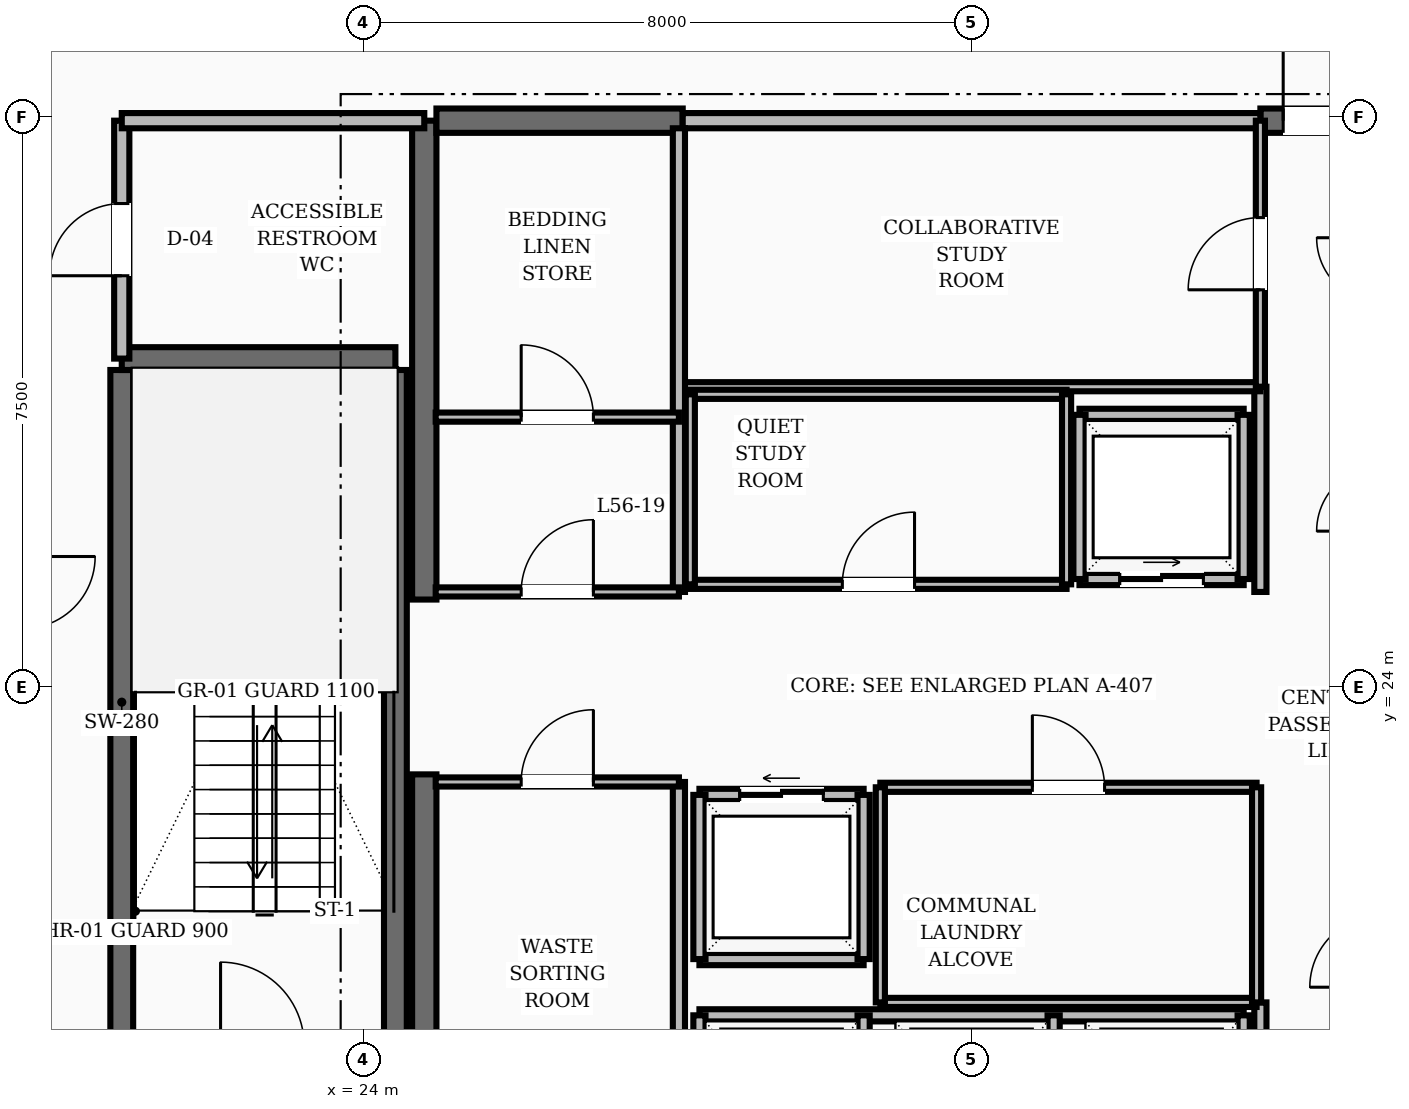
"""IFC4 building model, lengths in metres.
Left out: names, types, materials, properties, quantities, classifications, styles, units other than length and angle.
Written with IfcOpenShell. Run it as: python <this file> out.ifc"""

import sys

from ifc_helpers import new_model, si_unit, direction, frame, frame_2d, origin, place, context, subcontext, project, spatial, rectangle, extrude, element, fill, save


model = new_model("IFC4")
c1 = context("Model", 3, precision=1e-05, world=origin(), true_north=direction((0.0, 1.0)))
c2 = subcontext(c1, "Body", "Model", "MODEL_VIEW")
j1 = project(units=[si_unit("LENGTHUNIT", "METRE"), si_unit("PLANEANGLEUNIT", "RADIAN")], contexts=[c1])
p1 = place(None, origin())
s1 = spatial("IfcSite", under=j1, at=p1, CompositionType="ELEMENT")
p2 = place(p1, origin())
s2 = spatial("IfcBuilding", under=s1, at=p2, CompositionType="ELEMENT")
p3 = place(p2, frame((0.0, 0.0, 218.4)))
s3 = spatial("IfcBuildingStorey", under=s2, at=p3, CompositionType="ELEMENT", Elevation=218.4)
for number, where, z_axis, x_axis in (
    (1, (24.8, 16.55, 0.0), (0.0, 0.0, 1.0), (0.0, 1.0, 0.0)),
    (2, (24.8, 25.15, 0.0), (0.0, 0.0, 1.0), (0.0, 1.0, 0.0)),
):
    element("IfcWall", number, at=place(p3, frame(where, z_axis=z_axis, x_axis=x_axis)), inside=s3, PredefinedType="SHEAR", context=c2, shape_type="SweptSolid", body=[
        extrude(rectangle(XDim=6.3, YDim=0.32, at=frame_2d((3.15, 0.0))), origin(), (0.0, 0.0, 1.0), 3.6),
    ])
p4 = place(p3, frame((24.96, 31.45, 0.0), z_axis=(0.0, 0.0, 1.0), x_axis=(1.0, 0.0, 0.0)))
e3 = element("IfcWall", 3, at=p4, inside=s3, PredefinedType="SHEAR", context=c2, shape_type="SweptSolid", body=[
    extrude(rectangle(XDim=3.24, YDim=0.32, at=frame_2d((1.62, 0.0))), origin(), (0.0, 0.0, 1.0), 3.6),
])
p5 = place(p3, frame((35.8, 31.45, 0.0), z_axis=(0.0, 0.0, 1.0), x_axis=(1.0, 0.0, 0.0)))
e4 = element("IfcWall", 4, at=p5, inside=s3, PredefinedType="SHEAR", context=c2, shape_type="SweptSolid", body=[
    extrude(rectangle(XDim=3.24, YDim=0.32, at=frame_2d((1.62, 0.0))), origin(), (0.0, 0.0, 1.0), 3.6),
])
p6 = place(p5, frame((0.3, 0.0, 0.0)))
e5 = element("IfcOpeningElement", 5, at=p6, cuts=e4, PredefinedType="OPENING", context=c2, shape_type="SweptSolid", body=[
    extrude(rectangle(XDim=1.1, YDim=2.1, at=frame_2d((0.55, 1.05))), frame((0.0, 0.17, 0.0), z_axis=(0.0, -1.0, 0.0), x_axis=(1.0, 0.0, 0.0)), (0.0, 0.0, 1.0), 0.34),
])
for number, where, z_axis, x_axis in (
    (6, (20.82, 19.43, 0.0), (0.0, 0.0, 1.0), (0.0, 1.0, 0.0)),
    (7, (24.42, 19.43, 0.0), (0.0, 0.0, 1.0), (0.0, 1.0, 0.0)),
):
    element("IfcWall", number, at=place(p3, frame(where, z_axis=z_axis, x_axis=x_axis)), inside=s3, PredefinedType="SHEAR", context=c2, shape_type="SweptSolid", body=[
        extrude(rectangle(XDim=8.74, YDim=0.3, at=frame_2d((4.37, 0.0))), origin(), (0.0, 0.0, 1.0), 3.6),
    ])
p7 = place(p3, frame((20.82, 28.32, 0.0), z_axis=(0.0, 0.0, 1.0), x_axis=(1.0, 0.0, 0.0)))
e8 = element("IfcWall", 8, at=p7, inside=s3, PredefinedType="SHEAR", context=c2, shape_type="SweptSolid", body=[
    extrude(rectangle(XDim=3.6, YDim=0.3, at=frame_2d((1.8, 0.0))), origin(), (0.0, 0.0, 1.0), 3.6),
])
p8 = place(p3, frame((20.82, 28.32, 0.0), z_axis=(0.0, 0.0, 1.0), x_axis=(0.0, 1.0, 0.0)))
e9 = element("IfcWall", 9, at=p8, inside=s3, PredefinedType="SOLIDWALL", context=c2, shape_type="SweptSolid", body=[
    extrude(rectangle(XDim=3.13, YDim=0.2, at=frame_2d((1.565, 0.0))), origin(), (0.0, 0.0, 1.0), 2.87),
])
p9 = place(p8, frame((1.09, 0.0, 0.0)))
e10 = element("IfcOpeningElement", 10, at=p9, cuts=e9, PredefinedType="OPENING", context=c2, shape_type="SweptSolid", body=[
    extrude(rectangle(XDim=0.95, YDim=2.1, at=frame_2d((0.475, 1.05))), frame((0.0, 0.11, 0.0), z_axis=(0.0, -1.0, 0.0), x_axis=(1.0, 0.0, 0.0)), (0.0, 0.0, 1.0), 0.22),
])
p10 = place(p3, frame((20.82, 31.45, 0.0), z_axis=(0.0, 0.0, 1.0), x_axis=(1.0, 0.0, 0.0)))
e11 = element("IfcWall", 11, at=p10, inside=s3, PredefinedType="SOLIDWALL", context=c2, shape_type="SweptSolid", body=[
    extrude(rectangle(XDim=3.98, YDim=0.2, at=frame_2d((1.99, 0.0))), origin(), (0.0, 0.0, 1.0), 2.87),
])
p11 = place(p3, frame((35.8, 16.55, 0.0), z_axis=(0.0, 0.0, 1.0), x_axis=(0.0, 1.0, 0.0)))
e12 = element("IfcWall", 12, at=p11, inside=s3, PredefinedType="SOLIDWALL", context=c2, shape_type="SweptSolid", body=[
    extrude(rectangle(XDim=3.3, YDim=0.16, at=frame_2d((1.65, 0.0))), origin(), (0.0, 0.0, 1.0), 2.87),
])
p12 = place(p3, frame((35.8, 25.25, 0.0), z_axis=(0.0, 0.0, 1.0), x_axis=(0.0, 1.0, 0.0)))
e13 = element("IfcWall", 13, at=p12, inside=s3, PredefinedType="SOLIDWALL", context=c2, shape_type="SweptSolid", body=[
    extrude(rectangle(XDim=2.7, YDim=0.16, at=frame_2d((1.35, 0.0))), origin(), (0.0, 0.0, 1.0), 2.87),
])
p13 = place(p3, frame((33.42, 25.42, 0.0), z_axis=(0.0, 0.0, 1.0), x_axis=(1.0, 0.0, 0.0)))
e14 = element("IfcWall", 14, at=p13, inside=s3, PredefinedType="SOLIDWALL", context=c2, shape_type="SweptSolid", body=[
    extrude(rectangle(XDim=2.16, YDim=0.16, at=frame_2d((1.08, 0.0))), origin(), (0.0, 0.0, 1.0), 2.87),
])
p14 = place(p13, frame((0.53, 0.0, 0.0)))
e15 = element("IfcOpeningElement", 15, at=p14, cuts=e14, PredefinedType="OPENING", context=c2, shape_type="SweptSolid", body=[
    extrude(rectangle(XDim=1.1, YDim=2.15, at=frame_2d((0.55, 1.075))), frame((0.0, 0.09, 0.0), z_axis=(0.0, -1.0, 0.0), x_axis=(1.0, 0.0, 0.0)), (0.0, 0.0, 1.0), 0.18),
])
for number, where, z_axis, x_axis in (
    (16, (33.42, 27.58, 0.0), (0.0, 0.0, 1.0), (1.0, 0.0, 0.0)),
    (17, (33.42, 25.42, 0.0), (0.0, 0.0, 1.0), (0.0, 1.0, 0.0)),
    (18, (35.58, 25.42, 0.0), (0.0, 0.0, 1.0), (0.0, 1.0, 0.0)),
):
    element("IfcWall", number, at=place(p3, frame(where, z_axis=z_axis, x_axis=x_axis)), inside=s3, PredefinedType="SOLIDWALL", context=c2, shape_type="SweptSolid", body=[
        extrude(rectangle(XDim=2.16, YDim=0.16, at=frame_2d((1.08, 0.0))), origin(), (0.0, 0.0, 1.0), 2.87),
    ])
p15 = place(p3, frame((28.42, 22.58, 0.0), z_axis=(0.0, 0.0, 1.0), x_axis=(1.0, 0.0, 0.0)))
e19 = element("IfcWall", 19, at=p15, inside=s3, PredefinedType="SOLIDWALL", context=c2, shape_type="SweptSolid", body=[
    extrude(rectangle(XDim=2.16, YDim=0.16, at=frame_2d((1.08, 0.0))), origin(), (0.0, 0.0, 1.0), 2.87),
])
p16 = place(p15, frame((0.53, 0.0, 0.0)))
e20 = element("IfcOpeningElement", 20, at=p16, cuts=e19, PredefinedType="OPENING", context=c2, shape_type="SweptSolid", body=[
    extrude(rectangle(XDim=1.1, YDim=2.15, at=frame_2d((0.55, 1.075))), frame((0.0, 0.09, 0.0), z_axis=(0.0, -1.0, 0.0), x_axis=(1.0, 0.0, 0.0)), (0.0, 0.0, 1.0), 0.18),
])
for number, where, z_axis, x_axis in (
    (21, (28.42, 20.42, 0.0), (0.0, 0.0, 1.0), (1.0, 0.0, 0.0)),
    (22, (28.42, 20.42, 0.0), (0.0, 0.0, 1.0), (0.0, 1.0, 0.0)),
    (23, (30.58, 20.42, 0.0), (0.0, 0.0, 1.0), (0.0, 1.0, 0.0)),
):
    element("IfcWall", number, at=place(p3, frame(where, z_axis=z_axis, x_axis=x_axis)), inside=s3, PredefinedType="SOLIDWALL", context=c2, shape_type="SweptSolid", body=[
        extrude(rectangle(XDim=2.16, YDim=0.16, at=frame_2d((1.08, 0.0))), origin(), (0.0, 0.0, 1.0), 2.87),
    ])
p17 = place(p3, frame((28.42, 19.68, 0.0), z_axis=(0.0, 0.0, 1.0), x_axis=(1.0, 0.0, 0.0)))
e24 = element("IfcWall", 24, at=p17, inside=s3, PredefinedType="SOLIDWALL", context=c2, shape_type="SweptSolid", body=[
    extrude(rectangle(XDim=7.16, YDim=0.16, at=frame_2d((3.58, 0.0))), origin(), (0.0, 0.0, 1.0), 2.87),
])
for number, where, z_axis, x_axis in (
    (25, (28.42, 16.92, 0.0), (0.0, 0.0, 1.0), (0.0, 1.0, 0.0)),
    (26, (30.58, 16.92, 0.0), (0.0, 0.0, 1.0), (0.0, 1.0, 0.0)),
    (27, (33.08, 16.92, 0.0), (0.0, 0.0, 1.0), (0.0, 1.0, 0.0)),
    (28, (35.58, 16.92, 0.0), (0.0, 0.0, 1.0), (0.0, 1.0, 0.0)),
):
    element("IfcWall", number, at=place(p3, frame(where, z_axis=z_axis, x_axis=x_axis)), inside=s3, PredefinedType="SOLIDWALL", context=c2, shape_type="SweptSolid", body=[
        extrude(rectangle(XDim=2.76, YDim=0.16, at=frame_2d((1.38, 0.0))), origin(), (0.0, 0.0, 1.0), 2.87),
    ])
p18 = place(p3, frame((28.2, 31.45, 0.0), z_axis=(0.0, 0.0, 1.0), x_axis=(1.0, 0.0, 0.0)))
e29 = element("IfcWall", 29, at=p18, inside=s3, PredefinedType="SOLIDWALL", context=c2, shape_type="SweptSolid", body=[
    extrude(rectangle(XDim=7.6, YDim=0.2, at=frame_2d((3.8, 0.0))), origin(), (0.0, 0.0, 1.0), 2.87),
])
p19 = place(p3, frame((28.2, 27.95, 0.0), z_axis=(0.0, 0.0, 1.0), x_axis=(1.0, 0.0, 0.0)))
e30 = element("IfcWall", 30, at=p19, inside=s3, PredefinedType="PARTITIONING", context=c2, shape_type="SweptSolid", body=[
    extrude(rectangle(XDim=7.6, YDim=0.12, at=frame_2d((3.8, 0.0))), origin(), (0.0, 0.0, 1.0), 2.87),
])
p20 = place(p3, frame((35.8, 27.95, 0.0), z_axis=(0.0, 0.0, 1.0), x_axis=(0.0, 1.0, 0.0)))
e31 = element("IfcWall", 31, at=p20, inside=s3, PredefinedType="PARTITIONING", context=c2, shape_type="SweptSolid", body=[
    extrude(rectangle(XDim=3.5, YDim=0.12, at=frame_2d((1.75, 0.0))), origin(), (0.0, 0.0, 1.0), 2.87),
])
p21 = place(p20, frame((1.275, 0.0, 0.0)))
e32 = element("IfcOpeningElement", 32, at=p21, cuts=e31, PredefinedType="OPENING", context=c2, shape_type="SweptSolid", body=[
    extrude(rectangle(XDim=0.95, YDim=2.1, at=frame_2d((0.475, 1.05))), frame((0.0, 0.07, 0.0), z_axis=(0.0, -1.0, 0.0), x_axis=(1.0, 0.0, 0.0)), (0.0, 0.0, 1.0), 0.14),
])
p22 = place(p3, frame((28.3, 25.35, 0.0), z_axis=(0.0, 0.0, 1.0), x_axis=(1.0, 0.0, 0.0)))
e33 = element("IfcWall", 33, at=p22, inside=s3, PredefinedType="PARTITIONING", context=c2, shape_type="SweptSolid", body=[
    extrude(rectangle(XDim=4.95, YDim=0.12, at=frame_2d((2.475, 0.0))), origin(), (0.0, 0.0, 1.0), 2.87),
])
p23 = place(p22, frame((2.0, 0.0, 0.0)))
e34 = element("IfcOpeningElement", 34, at=p23, cuts=e33, PredefinedType="OPENING", context=c2, shape_type="SweptSolid", body=[
    extrude(rectangle(XDim=0.95, YDim=2.1, at=frame_2d((0.475, 1.05))), frame((0.0, 0.07, 0.0), z_axis=(0.0, -1.0, 0.0), x_axis=(1.0, 0.0, 0.0)), (0.0, 0.0, 1.0), 0.14),
])
p24 = place(p3, frame((28.3, 27.85, 0.0), z_axis=(0.0, 0.0, 1.0), x_axis=(1.0, 0.0, 0.0)))
e35 = element("IfcWall", 35, at=p24, inside=s3, PredefinedType="PARTITIONING", context=c2, shape_type="SweptSolid", body=[
    extrude(rectangle(XDim=4.95, YDim=0.12, at=frame_2d((2.475, 0.0))), origin(), (0.0, 0.0, 1.0), 2.87),
])
for number, where, z_axis, x_axis in (
    (36, (28.3, 25.35, 0.0), (0.0, 0.0, 1.0), (0.0, 1.0, 0.0)),
    (37, (33.25, 25.35, 0.0), (0.0, 0.0, 1.0), (0.0, 1.0, 0.0)),
):
    element("IfcWall", number, at=place(p3, frame(where, z_axis=z_axis, x_axis=x_axis)), inside=s3, PredefinedType="PARTITIONING", context=c2, shape_type="SweptSolid", body=[
        extrude(rectangle(XDim=2.5, YDim=0.12, at=frame_2d((1.25, 0.0))), origin(), (0.0, 0.0, 1.0), 2.87),
    ])
p25 = place(p3, frame((30.8, 22.68, 0.0), z_axis=(0.0, 0.0, 1.0), x_axis=(1.0, 0.0, 0.0)))
e38 = element("IfcWall", 38, at=p25, inside=s3, PredefinedType="PARTITIONING", context=c2, shape_type="SweptSolid", body=[
    extrude(rectangle(XDim=4.95, YDim=0.12, at=frame_2d((2.475, 0.0))), origin(), (0.0, 0.0, 1.0), 2.87),
])
p26 = place(p25, frame((2.0, 0.0, 0.0)))
e39 = element("IfcOpeningElement", 39, at=p26, cuts=e38, PredefinedType="OPENING", context=c2, shape_type="SweptSolid", body=[
    extrude(rectangle(XDim=0.95, YDim=2.1, at=frame_2d((0.475, 1.05))), frame((0.0, 0.07, 0.0), z_axis=(0.0, -1.0, 0.0), x_axis=(1.0, 0.0, 0.0)), (0.0, 0.0, 1.0), 0.14),
])
p27 = place(p3, frame((30.8, 19.85, 0.0), z_axis=(0.0, 0.0, 1.0), x_axis=(1.0, 0.0, 0.0)))
e40 = element("IfcWall", 40, at=p27, inside=s3, PredefinedType="PARTITIONING", context=c2, shape_type="SweptSolid", body=[
    extrude(rectangle(XDim=4.95, YDim=0.12, at=frame_2d((2.475, 0.0))), origin(), (0.0, 0.0, 1.0), 2.87),
])
for number, where, z_axis, x_axis in (
    (41, (30.8, 19.85, 0.0), (0.0, 0.0, 1.0), (0.0, 1.0, 0.0)),
    (42, (35.75, 19.85, 0.0), (0.0, 0.0, 1.0), (0.0, 1.0, 0.0)),
):
    element("IfcWall", number, at=place(p3, frame(where, z_axis=z_axis, x_axis=x_axis)), inside=s3, PredefinedType="PARTITIONING", context=c2, shape_type="SweptSolid", body=[
        extrude(rectangle(XDim=2.83, YDim=0.12, at=frame_2d((1.415, 0.0))), origin(), (0.0, 0.0, 1.0), 2.87),
    ])
p28 = place(p3, frame((28.15, 16.7, 0.0), z_axis=(0.0, 0.0, 1.0), x_axis=(0.0, 1.0, 0.0)))
e43 = element("IfcWall", 43, at=p28, inside=s3, PredefinedType="SOLIDWALL", context=c2, shape_type="SweptSolid", body=[
    extrude(rectangle(XDim=6.05, YDim=0.16, at=frame_2d((3.025, 0.0))), origin(), (0.0, 0.0, 1.0), 2.87),
])
p29 = place(p3, frame((28.15, 25.25, 0.0), z_axis=(0.0, 0.0, 1.0), x_axis=(0.0, 1.0, 0.0)))
e44 = element("IfcWall", 44, at=p29, inside=s3, PredefinedType="SOLIDWALL", context=c2, shape_type="SweptSolid", body=[
    extrude(rectangle(XDim=6.1, YDim=0.16, at=frame_2d((3.05, 0.0))), origin(), (0.0, 0.0, 1.0), 2.87),
])
p30 = place(p3, frame((24.95, 25.25, 0.0), z_axis=(0.0, 0.0, 1.0), x_axis=(1.0, 0.0, 0.0)))
e45 = element("IfcWall", 45, at=p30, inside=s3, PredefinedType="PARTITIONING", context=c2, shape_type="SweptSolid", body=[
    extrude(rectangle(XDim=3.2, YDim=0.12, at=frame_2d((1.6, 0.0))), origin(), (0.0, 0.0, 1.0), 2.87),
])
p31 = place(p30, frame((1.125, 0.0, 0.0)))
e46 = element("IfcOpeningElement", 46, at=p31, cuts=e45, PredefinedType="OPENING", context=c2, shape_type="SweptSolid", body=[
    extrude(rectangle(XDim=0.95, YDim=2.1, at=frame_2d((0.475, 1.05))), frame((0.0, 0.07, 0.0), z_axis=(0.0, -1.0, 0.0), x_axis=(1.0, 0.0, 0.0)), (0.0, 0.0, 1.0), 0.14),
])
p32 = place(p3, frame((24.95, 22.75, 0.0), z_axis=(0.0, 0.0, 1.0), x_axis=(1.0, 0.0, 0.0)))
e47 = element("IfcWall", 47, at=p32, inside=s3, PredefinedType="PARTITIONING", context=c2, shape_type="SweptSolid", body=[
    extrude(rectangle(XDim=3.2, YDim=0.12, at=frame_2d((1.6, 0.0))), origin(), (0.0, 0.0, 1.0), 2.87),
])
p33 = place(p32, frame((1.125, 0.0, 0.0)))
e48 = element("IfcOpeningElement", 48, at=p33, cuts=e47, PredefinedType="OPENING", context=c2, shape_type="SweptSolid", body=[
    extrude(rectangle(XDim=0.95, YDim=2.1, at=frame_2d((0.475, 1.05))), frame((0.0, 0.07, 0.0), z_axis=(0.0, -1.0, 0.0), x_axis=(1.0, 0.0, 0.0)), (0.0, 0.0, 1.0), 0.14),
])
p34 = place(p3, frame((24.95, 27.55, 0.0), z_axis=(0.0, 0.0, 1.0), x_axis=(1.0, 0.0, 0.0)))
e49 = element("IfcWall", 49, at=p34, inside=s3, PredefinedType="PARTITIONING", context=c2, shape_type="SweptSolid", body=[
    extrude(rectangle(XDim=3.2, YDim=0.12, at=frame_2d((1.6, 0.0))), origin(), (0.0, 0.0, 1.0), 2.87),
])
p35 = place(p34, frame((1.125, 0.0, 0.0)))
e50 = element("IfcOpeningElement", 50, at=p35, cuts=e49, PredefinedType="OPENING", context=c2, shape_type="SweptSolid", body=[
    extrude(rectangle(XDim=0.95, YDim=2.1, at=frame_2d((0.475, 1.05))), frame((0.0, 0.07, 0.0), z_axis=(0.0, -1.0, 0.0), x_axis=(1.0, 0.0, 0.0)), (0.0, 0.0, 1.0), 0.14),
])
p36 = place(p3, frame((21.635, 34.365, 0.0), z_axis=(0.0, 0.0, 1.0), x_axis=(-0.707106781187, -0.707106781187, 0.0)))
e51 = element("IfcWall", 51, at=p36, inside=s3, PredefinedType="SOLIDWALL", context=c2, shape_type="SweptSolid", body=[
    extrude(rectangle(XDim=2.916, YDim=0.16, at=frame_2d((1.458, 0.0))), origin(), (0.0, 0.0, 1.0), 2.87),
])
p37 = place(p36, frame((0.983, 0.0, 0.0)))
e52 = element("IfcOpeningElement", 52, at=p37, cuts=e51, PredefinedType="OPENING", context=c2, shape_type="SweptSolid", body=[
    extrude(rectangle(XDim=0.95, YDim=2.1, at=frame_2d((0.475, 1.05))), frame((0.0, 0.09, 0.0), z_axis=(0.0, -1.0, 0.0), x_axis=(1.0, 0.0, 0.0)), (0.0, 0.0, 1.0), 0.18),
])
p38 = place(p9, origin())
e53 = element("IfcDoor", 53, at=p38, inside=s3, OperationType="SINGLE_SWING_LEFT", PredefinedType="DOOR", context=c2, shape_type="SweptSolid", body=[
    extrude(rectangle(XDim=0.95, YDim=2.1, at=frame_2d((0.475, 1.05))), frame((0.0, 0.025, 0.0), z_axis=(0.0, -1.0, 0.0), x_axis=(1.0, 0.0, 0.0)), (0.0, 0.0, 1.0), 0.05),
])
fill(e10, e53)
p39 = place(p6, origin())
e54 = element("IfcDoor", 54, at=p39, inside=s3, OperationType="SINGLE_SWING_LEFT", PredefinedType="DOOR", context=c2, shape_type="SweptSolid", body=[
    extrude(rectangle(XDim=1.1, YDim=2.1, at=frame_2d((0.55, 1.05))), frame((0.0, 0.025, 0.0), z_axis=(0.0, -1.0, 0.0), x_axis=(1.0, 0.0, 0.0)), (0.0, 0.0, 1.0), 0.05),
])
fill(e5, e54)
p40 = place(p14, origin())
e55 = element("IfcDoor", 55, at=p40, inside=s3, OperationType="SLIDING_TO_RIGHT", PredefinedType="DOOR", context=c2, shape_type="SweptSolid", body=[
    extrude(rectangle(XDim=1.1, YDim=2.15, at=frame_2d((0.55, 1.075))), frame((0.0, 0.025, 0.0), z_axis=(0.0, -1.0, 0.0), x_axis=(1.0, 0.0, 0.0)), (0.0, 0.0, 1.0), 0.05),
])
fill(e15, e55)
p41 = place(p16, origin())
e56 = element("IfcDoor", 56, at=p41, inside=s3, OperationType="SLIDING_TO_LEFT", PredefinedType="DOOR", context=c2, shape_type="SweptSolid", body=[
    extrude(rectangle(XDim=1.1, YDim=2.15, at=frame_2d((0.55, 1.075))), frame((0.0, 0.025, 0.0), z_axis=(0.0, -1.0, 0.0), x_axis=(1.0, 0.0, 0.0)), (0.0, 0.0, 1.0), 0.05),
])
fill(e20, e56)
p42 = place(p21, origin())
e57 = element("IfcDoor", 57, at=p42, inside=s3, OperationType="SINGLE_SWING_LEFT", PredefinedType="DOOR", context=c2, shape_type="SweptSolid", body=[
    extrude(rectangle(XDim=0.95, YDim=2.1, at=frame_2d((0.475, 1.05))), frame((0.0, 0.025, 0.0), z_axis=(0.0, -1.0, 0.0), x_axis=(1.0, 0.0, 0.0)), (0.0, 0.0, 1.0), 0.05),
])
fill(e32, e57)
p43 = place(p23, origin())
e58 = element("IfcDoor", 58, at=p43, inside=s3, OperationType="SINGLE_SWING_RIGHT", PredefinedType="DOOR", context=c2, shape_type="SweptSolid", body=[
    extrude(rectangle(XDim=0.95, YDim=2.1, at=frame_2d((0.475, 1.05))), frame((0.0, 0.025, 0.0), z_axis=(0.0, -1.0, 0.0), x_axis=(1.0, 0.0, 0.0)), (0.0, 0.0, 1.0), 0.05),
])
fill(e34, e58)
p44 = place(p26, origin())
e59 = element("IfcDoor", 59, at=p44, inside=s3, OperationType="SINGLE_SWING_LEFT", PredefinedType="DOOR", context=c2, shape_type="SweptSolid", body=[
    extrude(rectangle(XDim=0.95, YDim=2.1, at=frame_2d((0.475, 1.05))), frame((0.0, 0.025, 0.0), z_axis=(0.0, -1.0, 0.0), x_axis=(1.0, 0.0, 0.0)), (0.0, 0.0, 1.0), 0.05),
])
fill(e39, e59)
p45 = place(p31, origin())
e60 = element("IfcDoor", 60, at=p45, inside=s3, OperationType="SINGLE_SWING_RIGHT", PredefinedType="DOOR", context=c2, shape_type="SweptSolid", body=[
    extrude(rectangle(XDim=0.95, YDim=2.1, at=frame_2d((0.475, 1.05))), frame((0.0, 0.025, 0.0), z_axis=(0.0, -1.0, 0.0), x_axis=(1.0, 0.0, 0.0)), (0.0, 0.0, 1.0), 0.05),
])
fill(e46, e60)
p46 = place(p35, origin())
e61 = element("IfcDoor", 61, at=p46, inside=s3, OperationType="SINGLE_SWING_LEFT", PredefinedType="DOOR", context=c2, shape_type="SweptSolid", body=[
    extrude(rectangle(XDim=0.95, YDim=2.1, at=frame_2d((0.475, 1.05))), frame((0.0, 0.025, 0.0), z_axis=(0.0, -1.0, 0.0), x_axis=(1.0, 0.0, 0.0)), (0.0, 0.0, 1.0), 0.05),
])
fill(e50, e61)
p47 = place(p33, origin())
e62 = element("IfcDoor", 62, at=p47, inside=s3, OperationType="SINGLE_SWING_RIGHT", PredefinedType="DOOR", context=c2, shape_type="SweptSolid", body=[
    extrude(rectangle(XDim=0.95, YDim=2.1, at=frame_2d((0.475, 1.05))), frame((0.0, 0.025, 0.0), z_axis=(0.0, -1.0, 0.0), x_axis=(1.0, 0.0, 0.0)), (0.0, 0.0, 1.0), 0.05),
])
fill(e48, e62)
save(model, sys.argv[1])
